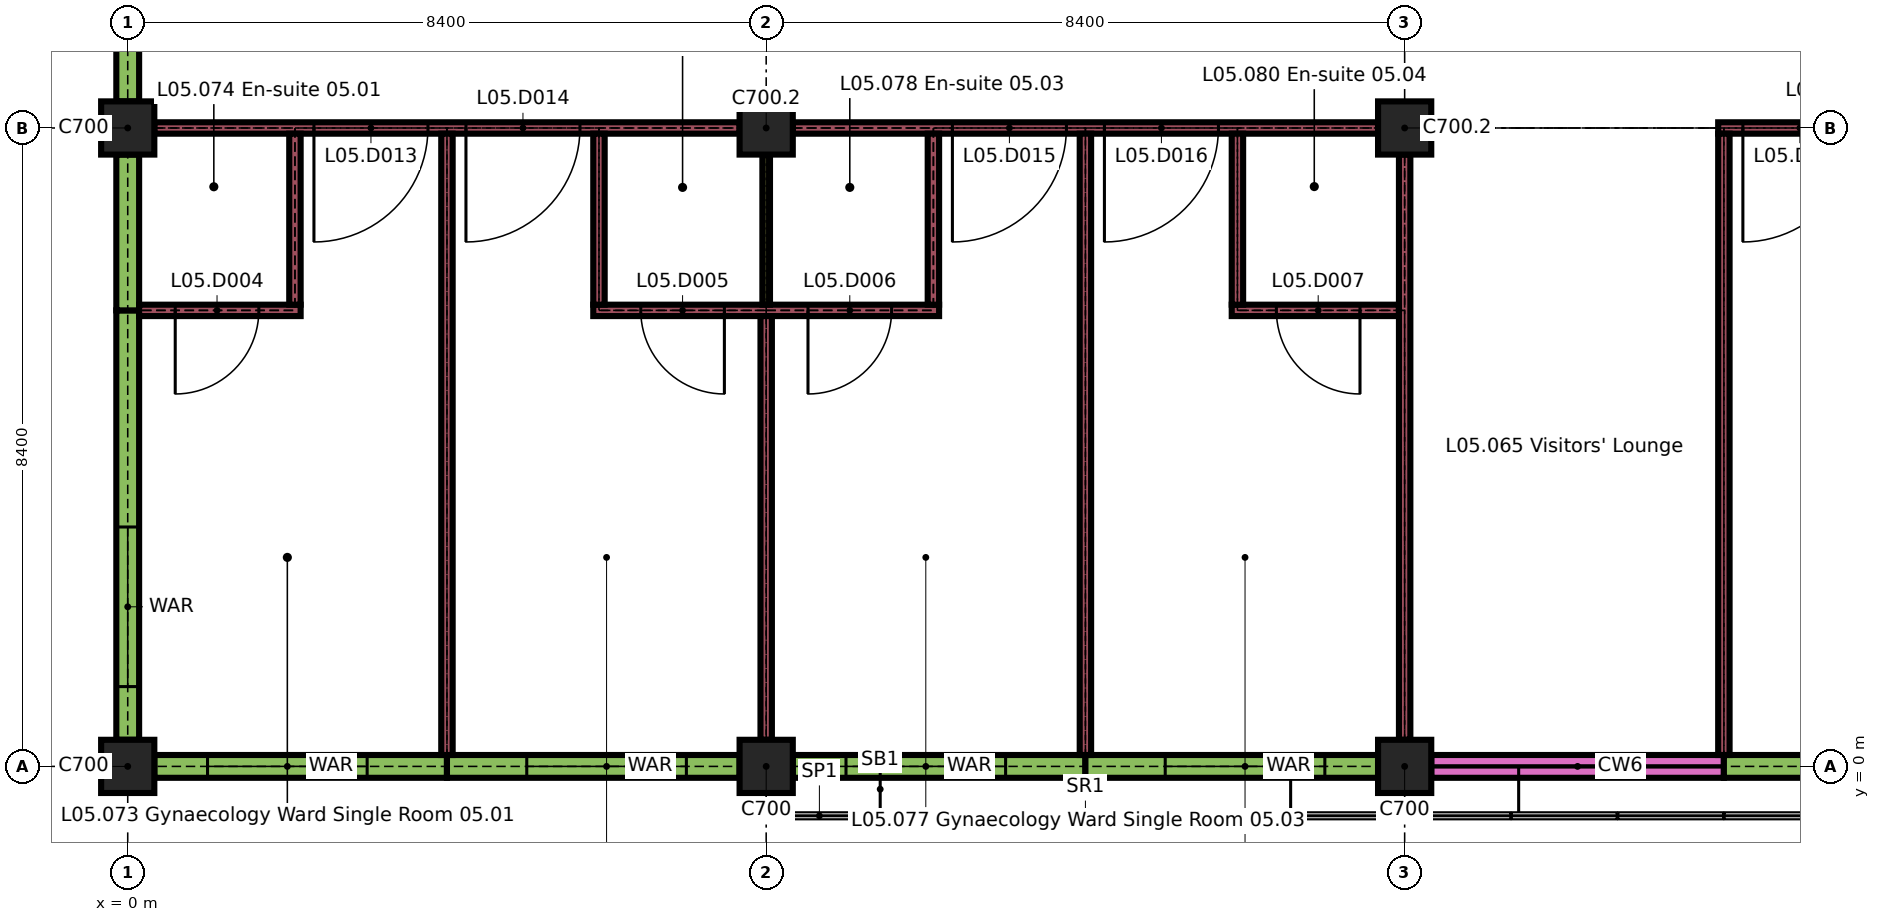
"""IFC4 building model, lengths in metres.
Left out: names, types, materials, properties, quantities, classifications, styles, units other than length and angle.
Written with IfcOpenShell. Run it as: python <this file> out.ifc"""

import sys

from ifc_helpers import new_model, si_unit, direction, frame, frame_2d, origin, origin_2d, place, context, subcontext, project, spatial, rectangle, extrude, element, fill, save


model = new_model("IFC4")
c1 = context("Model", 3, precision=1e-05, world=origin(), true_north=direction((0.0, 1.0)))
c2 = subcontext(c1, "Body", "Model", "MODEL_VIEW")
j1 = project(units=[si_unit("LENGTHUNIT", "METRE"), si_unit("PLANEANGLEUNIT", "RADIAN")], contexts=[c1])
p1 = place(None, origin())
s1 = spatial("IfcSite", under=j1, at=p1, CompositionType="ELEMENT")
p2 = place(p1, origin())
s2 = spatial("IfcBuilding", under=s1, at=p2, CompositionType="ELEMENT")
p3 = place(p2, frame((0.0, 0.0, 22.5)))
s3 = spatial("IfcBuildingStorey", under=s2, at=p3, CompositionType="ELEMENT", Elevation=22.5)
for number, where, z_axis, x_axis in (
    (1, (0.0, 0.0, 0.0), (0.0, 0.0, 1.0), (1.0, 0.0, 0.0)),
    (2, (8.4, 0.0, 0.0), (0.0, 0.0, 1.0), (1.0, 0.0, 0.0)),
    (3, (16.8, 0.0, 0.0), (0.0, 0.0, 1.0), (1.0, 0.0, 0.0)),
    (4, (0.0, 8.4, 0.0), (0.0, 0.0, 1.0), (1.0, 0.0, 0.0)),
    (5, (8.4, 8.4, 0.0), (0.0, 0.0, 1.0), (1.0, 0.0, 0.0)),
    (6, (16.8, 8.4, 0.0), (0.0, 0.0, 1.0), (1.0, 0.0, 0.0)),
):
    element("IfcColumn", number, at=place(p3, frame(where, z_axis=z_axis, x_axis=x_axis)), inside=s3, PredefinedType="COLUMN", context=c2, shape_type="SweptSolid", body=[
        extrude(rectangle(XDim=0.7, YDim=0.7, at=origin_2d()), origin(), (0.0, 0.0, 1.0), 3.26),
    ])
p4 = place(p3, frame((0.35, 0.0, 0.0), z_axis=(0.0, 0.0, 1.0), x_axis=(1.0, 0.0, 0.0)))
e7 = element("IfcWall", 7, at=p4, inside=s3, PredefinedType="SOLIDWALL", context=c2, shape_type="SweptSolid", body=[
    extrude(rectangle(XDim=3.85, YDim=0.3, at=frame_2d((1.925, 0.0))), origin(), (0.0, 0.0, 1.0), 2.96),
])
p5 = place(p4, frame((0.7, 0.0, 0.9)))
e8 = element("IfcOpeningElement", 8, at=p5, cuts=e7, PredefinedType="OPENING", context=c2, shape_type="SweptSolid", body=[
    extrude(rectangle(XDim=2.1, YDim=1.5, at=frame_2d((1.05, 0.75))), frame((0.0, 0.16, 0.0), z_axis=(0.0, -1.0, 0.0), x_axis=(1.0, 0.0, 0.0)), (0.0, 0.0, 1.0), 0.32),
])
p6 = place(p3, frame((4.2, 0.0, 0.0), z_axis=(0.0, 0.0, 1.0), x_axis=(1.0, 0.0, 0.0)))
e9 = element("IfcWall", 9, at=p6, inside=s3, PredefinedType="SOLIDWALL", context=c2, shape_type="SweptSolid", body=[
    extrude(rectangle(XDim=3.85, YDim=0.3, at=frame_2d((1.925, 0.0))), origin(), (0.0, 0.0, 1.0), 2.96),
])
p7 = place(p6, frame((1.05, 0.0, 0.9)))
e10 = element("IfcOpeningElement", 10, at=p7, cuts=e9, PredefinedType="OPENING", context=c2, shape_type="SweptSolid", body=[
    extrude(rectangle(XDim=2.1, YDim=1.5, at=frame_2d((1.05, 0.75))), frame((0.0, 0.16, 0.0), z_axis=(0.0, -1.0, 0.0), x_axis=(1.0, 0.0, 0.0)), (0.0, 0.0, 1.0), 0.32),
])
p8 = place(p3, frame((8.75, 0.0, 0.0), z_axis=(0.0, 0.0, 1.0), x_axis=(1.0, 0.0, 0.0)))
e11 = element("IfcWall", 11, at=p8, inside=s3, PredefinedType="SOLIDWALL", context=c2, shape_type="SweptSolid", body=[
    extrude(rectangle(XDim=3.85, YDim=0.3, at=frame_2d((1.925, 0.0))), origin(), (0.0, 0.0, 1.0), 2.96),
])
p9 = place(p8, frame((0.7, 0.0, 0.9)))
e12 = element("IfcOpeningElement", 12, at=p9, cuts=e11, PredefinedType="OPENING", context=c2, shape_type="SweptSolid", body=[
    extrude(rectangle(XDim=2.1, YDim=1.5, at=frame_2d((1.05, 0.75))), frame((0.0, 0.16, 0.0), z_axis=(0.0, -1.0, 0.0), x_axis=(1.0, 0.0, 0.0)), (0.0, 0.0, 1.0), 0.32),
])
p10 = place(p3, frame((12.6, 0.0, 0.0), z_axis=(0.0, 0.0, 1.0), x_axis=(1.0, 0.0, 0.0)))
e13 = element("IfcWall", 13, at=p10, inside=s3, PredefinedType="SOLIDWALL", context=c2, shape_type="SweptSolid", body=[
    extrude(rectangle(XDim=3.85, YDim=0.3, at=frame_2d((1.925, 0.0))), origin(), (0.0, 0.0, 1.0), 2.96),
])
p11 = place(p10, frame((1.05, 0.0, 0.9)))
e14 = element("IfcOpeningElement", 14, at=p11, cuts=e13, PredefinedType="OPENING", context=c2, shape_type="SweptSolid", body=[
    extrude(rectangle(XDim=2.1, YDim=1.5, at=frame_2d((1.05, 0.75))), frame((0.0, 0.16, 0.0), z_axis=(0.0, -1.0, 0.0), x_axis=(1.0, 0.0, 0.0)), (0.0, 0.0, 1.0), 0.32),
])
p12 = place(p3, frame((17.15, 0.0, 0.0), z_axis=(0.0, 0.0, 1.0), x_axis=(1.0, 0.0, 0.0)))
e15 = element("IfcWall", 15, at=p12, inside=s3, PredefinedType="SOLIDWALL", context=c2, shape_type="SweptSolid", body=[
    extrude(rectangle(XDim=3.85, YDim=0.3, at=frame_2d((1.925, 0.0))), origin(), (0.0, 0.0, 1.0), 0.6),
])
p13 = place(p3, frame((21.0, 0.0, 0.0), z_axis=(0.0, 0.0, 1.0), x_axis=(1.0, 0.0, 0.0)))
e16 = element("IfcWall", 16, at=p13, inside=s3, PredefinedType="SOLIDWALL", context=c2, shape_type="SweptSolid", body=[
    extrude(rectangle(XDim=3.85, YDim=0.3, at=frame_2d((1.925, 0.0))), origin(), (0.0, 0.0, 1.0), 2.96),
])
p14 = place(p13, frame((1.05, 0.0, 0.9)))
e17 = element("IfcOpeningElement", 17, at=p14, cuts=e16, PredefinedType="OPENING", context=c2, shape_type="SweptSolid", body=[
    extrude(rectangle(XDim=2.1, YDim=1.5, at=frame_2d((1.05, 0.75))), frame((0.0, 0.16, 0.0), z_axis=(0.0, -1.0, 0.0), x_axis=(1.0, 0.0, 0.0)), (0.0, 0.0, 1.0), 0.32),
])
p15 = place(p3, frame((0.0, 0.35, 0.0), z_axis=(0.0, 0.0, 1.0), x_axis=(0.0, 1.0, 0.0)))
e18 = element("IfcWall", 18, at=p15, inside=s3, PredefinedType="SOLIDWALL", context=c2, shape_type="SweptSolid", body=[
    extrude(rectangle(XDim=5.65, YDim=0.3, at=frame_2d((2.825, 0.0))), origin(), (0.0, 0.0, 1.0), 2.96),
])
p16 = place(p15, frame((0.7, 0.0, 0.9)))
e19 = element("IfcOpeningElement", 19, at=p16, cuts=e18, PredefinedType="OPENING", context=c2, shape_type="SweptSolid", body=[
    extrude(rectangle(XDim=2.1, YDim=1.5, at=frame_2d((1.05, 0.75))), frame((0.0, 0.16, 0.0), z_axis=(0.0, -1.0, 0.0), x_axis=(1.0, 0.0, 0.0)), (0.0, 0.0, 1.0), 0.32),
])
p17 = place(p3, frame((0.0, 6.0, 0.0), z_axis=(0.0, 0.0, 1.0), x_axis=(0.0, 1.0, 0.0)))
e20 = element("IfcWall", 20, at=p17, inside=s3, PredefinedType="SOLIDWALL", context=c2, shape_type="SweptSolid", body=[
    extrude(rectangle(XDim=2.05, YDim=0.3, at=frame_2d((1.025, 0.0))), origin(), (0.0, 0.0, 1.0), 2.96),
])
p18 = place(p3, frame((0.0, 8.75, 0.0), z_axis=(0.0, 0.0, 1.0), x_axis=(0.0, 1.0, 0.0)))
e21 = element("IfcWall", 21, at=p18, inside=s3, PredefinedType="SOLIDWALL", context=c2, shape_type="SweptSolid", body=[
    extrude(rectangle(XDim=2.65, YDim=0.3, at=frame_2d((1.325, 0.0))), origin(), (0.0, 0.0, 1.0), 2.96),
])
p19 = place(p18, frame((1.3, 0.0, 0.9)))
e22 = element("IfcOpeningElement", 22, at=p19, cuts=e21, PredefinedType="OPENING", context=c2, shape_type="SweptSolid", body=[
    extrude(rectangle(XDim=0.9, YDim=1.5, at=frame_2d((0.45, 0.75))), frame((0.0, 0.16, 0.0), z_axis=(0.0, -1.0, 0.0), x_axis=(1.0, 0.0, 0.0)), (0.0, 0.0, 1.0), 0.32),
])
p20 = place(p3, frame((0.15, 6.0, 0.0), z_axis=(0.0, 0.0, 1.0), x_axis=(1.0, 0.0, 0.0)))
e23 = element("IfcWall", 23, at=p20, inside=s3, PredefinedType="PARTITIONING", context=c2, shape_type="SweptSolid", body=[
    extrude(rectangle(XDim=2.125, YDim=0.15, at=frame_2d((1.062, 0.0))), origin(), (0.0, 0.0, 1.0), 3.26),
])
p21 = place(p20, frame((0.475, 0.0, 0.0)))
e24 = element("IfcOpeningElement", 24, at=p21, cuts=e23, PredefinedType="OPENING", context=c2, shape_type="SweptSolid", body=[
    extrude(rectangle(XDim=1.1, YDim=2.1, at=frame_2d((0.55, 1.05))), frame((0.0, 0.085, 0.0), z_axis=(0.0, -1.0, 0.0), x_axis=(1.0, 0.0, 0.0)), (0.0, 0.0, 1.0), 0.17),
])
p22 = place(p3, frame((6.125, 6.0, 0.0), z_axis=(0.0, 0.0, 1.0), x_axis=(1.0, 0.0, 0.0)))
e25 = element("IfcWall", 25, at=p22, inside=s3, PredefinedType="PARTITIONING", context=c2, shape_type="SweptSolid", body=[
    extrude(rectangle(XDim=4.55, YDim=0.15, at=frame_2d((2.275, 0.0))), origin(), (0.0, 0.0, 1.0), 3.26),
])
p23 = place(p22, frame((0.625, 0.0, 0.0)))
e26 = element("IfcOpeningElement", 26, at=p23, cuts=e25, PredefinedType="OPENING", context=c2, shape_type="SweptSolid", body=[
    extrude(rectangle(XDim=1.1, YDim=2.1, at=frame_2d((0.55, 1.05))), frame((0.0, 0.085, 0.0), z_axis=(0.0, -1.0, 0.0), x_axis=(1.0, 0.0, 0.0)), (0.0, 0.0, 1.0), 0.17),
])
p24 = place(p22, frame((2.825, 0.0, 0.0)))
e27 = element("IfcOpeningElement", 27, at=p24, cuts=e25, PredefinedType="OPENING", context=c2, shape_type="SweptSolid", body=[
    extrude(rectangle(XDim=1.1, YDim=2.1, at=frame_2d((0.55, 1.05))), frame((0.0, 0.085, 0.0), z_axis=(0.0, -1.0, 0.0), x_axis=(1.0, 0.0, 0.0)), (0.0, 0.0, 1.0), 0.17),
])
p25 = place(p3, frame((14.525, 6.0, 0.0), z_axis=(0.0, 0.0, 1.0), x_axis=(1.0, 0.0, 0.0)))
e28 = element("IfcWall", 28, at=p25, inside=s3, PredefinedType="PARTITIONING", context=c2, shape_type="SweptSolid", body=[
    extrude(rectangle(XDim=2.2, YDim=0.15, at=frame_2d((1.1, 0.0))), origin(), (0.0, 0.0, 1.0), 3.26),
])
p26 = place(p25, frame((0.587, 0.0, 0.0)))
e29 = element("IfcOpeningElement", 29, at=p26, cuts=e28, PredefinedType="OPENING", context=c2, shape_type="SweptSolid", body=[
    extrude(rectangle(XDim=1.1, YDim=2.1, at=frame_2d((0.55, 1.05))), frame((0.0, 0.085, 0.0), z_axis=(0.0, -1.0, 0.0), x_axis=(1.0, 0.0, 0.0)), (0.0, 0.0, 1.0), 0.17),
])
p27 = place(p3, frame((0.35, 8.4, 0.0), z_axis=(0.0, 0.0, 1.0), x_axis=(1.0, 0.0, 0.0)))
e30 = element("IfcWall", 30, at=p27, inside=s3, PredefinedType="PARTITIONING", context=c2, shape_type="SweptSolid", body=[
    extrude(rectangle(XDim=7.7, YDim=0.15, at=frame_2d((3.85, 0.0))), origin(), (0.0, 0.0, 1.0), 3.26),
])
p28 = place(p27, frame((2.1, 0.0, 0.0)))
e31 = element("IfcOpeningElement", 31, at=p28, cuts=e30, PredefinedType="OPENING", context=c2, shape_type="SweptSolid", body=[
    extrude(rectangle(XDim=1.5, YDim=2.4, at=frame_2d((0.75, 1.2))), frame((0.0, 0.085, 0.0), z_axis=(0.0, -1.0, 0.0), x_axis=(1.0, 0.0, 0.0)), (0.0, 0.0, 1.0), 0.17),
])
p29 = place(p27, frame((4.1, 0.0, 0.0)))
e32 = element("IfcOpeningElement", 32, at=p29, cuts=e30, PredefinedType="OPENING", context=c2, shape_type="SweptSolid", body=[
    extrude(rectangle(XDim=1.5, YDim=2.4, at=frame_2d((0.75, 1.2))), frame((0.0, 0.085, 0.0), z_axis=(0.0, -1.0, 0.0), x_axis=(1.0, 0.0, 0.0)), (0.0, 0.0, 1.0), 0.17),
])
p30 = place(p3, frame((8.75, 8.4, 0.0), z_axis=(0.0, 0.0, 1.0), x_axis=(1.0, 0.0, 0.0)))
e33 = element("IfcWall", 33, at=p30, inside=s3, PredefinedType="PARTITIONING", context=c2, shape_type="SweptSolid", body=[
    extrude(rectangle(XDim=7.7, YDim=0.15, at=frame_2d((3.85, 0.0))), origin(), (0.0, 0.0, 1.0), 3.26),
])
p31 = place(p30, frame((2.1, 0.0, 0.0)))
e34 = element("IfcOpeningElement", 34, at=p31, cuts=e33, PredefinedType="OPENING", context=c2, shape_type="SweptSolid", body=[
    extrude(rectangle(XDim=1.5, YDim=2.4, at=frame_2d((0.75, 1.2))), frame((0.0, 0.085, 0.0), z_axis=(0.0, -1.0, 0.0), x_axis=(1.0, 0.0, 0.0)), (0.0, 0.0, 1.0), 0.17),
])
p32 = place(p30, frame((4.1, 0.0, 0.0)))
e35 = element("IfcOpeningElement", 35, at=p32, cuts=e33, PredefinedType="OPENING", context=c2, shape_type="SweptSolid", body=[
    extrude(rectangle(XDim=1.5, YDim=2.4, at=frame_2d((0.75, 1.2))), frame((0.0, 0.085, 0.0), z_axis=(0.0, -1.0, 0.0), x_axis=(1.0, 0.0, 0.0)), (0.0, 0.0, 1.0), 0.17),
])
p33 = place(p3, frame((20.925, 8.4, 0.0), z_axis=(0.0, 0.0, 1.0), x_axis=(1.0, 0.0, 0.0)))
e36 = element("IfcWall", 36, at=p33, inside=s3, PredefinedType="PARTITIONING", context=c2, shape_type="SweptSolid", body=[
    extrude(rectangle(XDim=3.925, YDim=0.15, at=frame_2d((1.962, 0.0))), origin(), (0.0, 0.0, 1.0), 3.26),
])
p34 = place(p33, frame((0.325, 0.0, 0.0)))
e37 = element("IfcOpeningElement", 37, at=p34, cuts=e36, PredefinedType="OPENING", context=c2, shape_type="SweptSolid", body=[
    extrude(rectangle(XDim=1.5, YDim=2.4, at=frame_2d((0.75, 1.2))), frame((0.0, 0.085, 0.0), z_axis=(0.0, -1.0, 0.0), x_axis=(1.0, 0.0, 0.0)), (0.0, 0.0, 1.0), 0.17),
])
p35 = place(p3, frame((2.2, 6.075, 0.0), z_axis=(0.0, 0.0, 1.0), x_axis=(0.0, 1.0, 0.0)))
e38 = element("IfcWall", 38, at=p35, inside=s3, PredefinedType="PARTITIONING", context=c2, shape_type="SweptSolid", body=[
    extrude(rectangle(XDim=2.25, YDim=0.15, at=frame_2d((1.125, 0.0))), origin(), (0.0, 0.0, 1.0), 3.26),
])
p36 = place(p3, frame((4.2, 0.15, 0.0), z_axis=(0.0, 0.0, 1.0), x_axis=(0.0, 1.0, 0.0)))
e39 = element("IfcWall", 39, at=p36, inside=s3, PredefinedType="PARTITIONING", context=c2, shape_type="SweptSolid", body=[
    extrude(rectangle(XDim=8.175, YDim=0.15, at=frame_2d((4.087, 0.0))), origin(), (0.0, 0.0, 1.0), 3.26),
])
p37 = place(p3, frame((6.2, 6.075, 0.0), z_axis=(0.0, 0.0, 1.0), x_axis=(0.0, 1.0, 0.0)))
e40 = element("IfcWall", 40, at=p37, inside=s3, PredefinedType="PARTITIONING", context=c2, shape_type="SweptSolid", body=[
    extrude(rectangle(XDim=2.25, YDim=0.15, at=frame_2d((1.125, 0.0))), origin(), (0.0, 0.0, 1.0), 3.26),
])
p38 = place(p3, frame((8.4, 0.35, 0.0), z_axis=(0.0, 0.0, 1.0), x_axis=(0.0, 1.0, 0.0)))
e41 = element("IfcWall", 41, at=p38, inside=s3, PredefinedType="PARTITIONING", context=c2, shape_type="SweptSolid", body=[
    extrude(rectangle(XDim=5.575, YDim=0.15, at=frame_2d((2.788, 0.0))), origin(), (0.0, 0.0, 1.0), 3.26),
])
p39 = place(p3, frame((8.4, 6.075, 0.0), z_axis=(0.0, 0.0, 1.0), x_axis=(0.0, 1.0, 0.0)))
e42 = element("IfcWall", 42, at=p39, inside=s3, PredefinedType="PARTITIONING", context=c2, shape_type="SweptSolid", body=[
    extrude(rectangle(XDim=1.975, YDim=0.1, at=frame_2d((0.988, 0.0))), origin(), (0.0, 0.0, 1.0), 3.26),
])
p40 = place(p3, frame((10.6, 6.075, 0.0), z_axis=(0.0, 0.0, 1.0), x_axis=(0.0, 1.0, 0.0)))
e43 = element("IfcWall", 43, at=p40, inside=s3, PredefinedType="PARTITIONING", context=c2, shape_type="SweptSolid", body=[
    extrude(rectangle(XDim=2.25, YDim=0.15, at=frame_2d((1.125, 0.0))), origin(), (0.0, 0.0, 1.0), 3.26),
])
p41 = place(p3, frame((12.6, 0.15, 0.0), z_axis=(0.0, 0.0, 1.0), x_axis=(0.0, 1.0, 0.0)))
e44 = element("IfcWall", 44, at=p41, inside=s3, PredefinedType="PARTITIONING", context=c2, shape_type="SweptSolid", body=[
    extrude(rectangle(XDim=8.175, YDim=0.15, at=frame_2d((4.087, 0.0))), origin(), (0.0, 0.0, 1.0), 3.26),
])
p42 = place(p3, frame((14.6, 6.075, 0.0), z_axis=(0.0, 0.0, 1.0), x_axis=(0.0, 1.0, 0.0)))
e45 = element("IfcWall", 45, at=p42, inside=s3, PredefinedType="PARTITIONING", context=c2, shape_type="SweptSolid", body=[
    extrude(rectangle(XDim=2.25, YDim=0.15, at=frame_2d((1.125, 0.0))), origin(), (0.0, 0.0, 1.0), 3.26),
])
p43 = place(p3, frame((16.8, 0.35, 0.0), z_axis=(0.0, 0.0, 1.0), x_axis=(0.0, 1.0, 0.0)))
e46 = element("IfcWall", 46, at=p43, inside=s3, PredefinedType="PARTITIONING", context=c2, shape_type="SweptSolid", body=[
    extrude(rectangle(XDim=7.7, YDim=0.15, at=frame_2d((3.85, 0.0))), origin(), (0.0, 0.0, 1.0), 3.26),
])
p44 = place(p3, frame((21.0, 0.15, 0.0), z_axis=(0.0, 0.0, 1.0), x_axis=(0.0, 1.0, 0.0)))
e47 = element("IfcWall", 47, at=p44, inside=s3, PredefinedType="PARTITIONING", context=c2, shape_type="SweptSolid", body=[
    extrude(rectangle(XDim=8.175, YDim=0.15, at=frame_2d((4.087, 0.0))), origin(), (0.0, 0.0, 1.0), 3.26),
])
p45 = place(p5, origin())
e48 = element("IfcWindow", 48, at=p45, inside=s3, PartitioningType="DOUBLE_PANEL_VERTICAL", PredefinedType="WINDOW", context=c2, shape_type="SweptSolid", body=[
    extrude(rectangle(XDim=2.1, YDim=1.5, at=frame_2d((1.05, 0.75))), frame((0.0, 0.05, 0.0), z_axis=(0.0, -1.0, 0.0), x_axis=(1.0, 0.0, 0.0)), (0.0, 0.0, 1.0), 0.1),
])
fill(e8, e48)
p46 = place(p7, origin())
e49 = element("IfcWindow", 49, at=p46, inside=s3, PartitioningType="DOUBLE_PANEL_VERTICAL", PredefinedType="WINDOW", context=c2, shape_type="SweptSolid", body=[
    extrude(rectangle(XDim=2.1, YDim=1.5, at=frame_2d((1.05, 0.75))), frame((0.0, 0.05, 0.0), z_axis=(0.0, -1.0, 0.0), x_axis=(1.0, 0.0, 0.0)), (0.0, 0.0, 1.0), 0.1),
])
fill(e10, e49)
p47 = place(p9, origin())
e50 = element("IfcWindow", 50, at=p47, inside=s3, PartitioningType="DOUBLE_PANEL_VERTICAL", PredefinedType="WINDOW", context=c2, shape_type="SweptSolid", body=[
    extrude(rectangle(XDim=2.1, YDim=1.5, at=frame_2d((1.05, 0.75))), frame((0.0, 0.05, 0.0), z_axis=(0.0, -1.0, 0.0), x_axis=(1.0, 0.0, 0.0)), (0.0, 0.0, 1.0), 0.1),
])
fill(e12, e50)
p48 = place(p11, origin())
e51 = element("IfcWindow", 51, at=p48, inside=s3, PartitioningType="DOUBLE_PANEL_VERTICAL", PredefinedType="WINDOW", context=c2, shape_type="SweptSolid", body=[
    extrude(rectangle(XDim=2.1, YDim=1.5, at=frame_2d((1.05, 0.75))), frame((0.0, 0.05, 0.0), z_axis=(0.0, -1.0, 0.0), x_axis=(1.0, 0.0, 0.0)), (0.0, 0.0, 1.0), 0.1),
])
fill(e14, e51)
p49 = place(p16, origin())
e52 = element("IfcWindow", 52, at=p49, inside=s3, PartitioningType="DOUBLE_PANEL_VERTICAL", PredefinedType="WINDOW", context=c2, shape_type="SweptSolid", body=[
    extrude(rectangle(XDim=2.1, YDim=1.5, at=frame_2d((1.05, 0.75))), frame((0.0, 0.05, 0.0), z_axis=(0.0, -1.0, 0.0), x_axis=(1.0, 0.0, 0.0)), (0.0, 0.0, 1.0), 0.1),
])
fill(e19, e52)
p50 = place(p21, origin())
e53 = element("IfcDoor", 53, at=p50, inside=s3, OperationType="SINGLE_SWING_LEFT", PredefinedType="DOOR", context=c2, shape_type="SweptSolid", body=[
    extrude(rectangle(XDim=1.1, YDim=2.1, at=frame_2d((0.55, 1.05))), frame((0.0, 0.025, 0.0), z_axis=(0.0, -1.0, 0.0), x_axis=(1.0, 0.0, 0.0)), (0.0, 0.0, 1.0), 0.05),
])
fill(e24, e53)
p51 = place(p23, origin())
e54 = element("IfcDoor", 54, at=p51, inside=s3, OperationType="SINGLE_SWING_RIGHT", PredefinedType="DOOR", context=c2, shape_type="SweptSolid", body=[
    extrude(rectangle(XDim=1.1, YDim=2.1, at=frame_2d((0.55, 1.05))), frame((0.0, 0.025, 0.0), z_axis=(0.0, -1.0, 0.0), x_axis=(1.0, 0.0, 0.0)), (0.0, 0.0, 1.0), 0.05),
])
fill(e26, e54)
p52 = place(p24, origin())
e55 = element("IfcDoor", 55, at=p52, inside=s3, OperationType="SINGLE_SWING_LEFT", PredefinedType="DOOR", context=c2, shape_type="SweptSolid", body=[
    extrude(rectangle(XDim=1.1, YDim=2.1, at=frame_2d((0.55, 1.05))), frame((0.0, 0.025, 0.0), z_axis=(0.0, -1.0, 0.0), x_axis=(1.0, 0.0, 0.0)), (0.0, 0.0, 1.0), 0.05),
])
fill(e27, e55)
p53 = place(p26, origin())
e56 = element("IfcDoor", 56, at=p53, inside=s3, OperationType="SINGLE_SWING_RIGHT", PredefinedType="DOOR", context=c2, shape_type="SweptSolid", body=[
    extrude(rectangle(XDim=1.1, YDim=2.1, at=frame_2d((0.55, 1.05))), frame((0.0, 0.025, 0.0), z_axis=(0.0, -1.0, 0.0), x_axis=(1.0, 0.0, 0.0)), (0.0, 0.0, 1.0), 0.05),
])
fill(e29, e56)
p54 = place(p28, origin())
e57 = element("IfcDoor", 57, at=p54, inside=s3, OperationType="SINGLE_SWING_LEFT", PredefinedType="DOOR", context=c2, shape_type="SweptSolid", body=[
    extrude(rectangle(XDim=1.5, YDim=2.4, at=frame_2d((0.75, 1.2))), frame((0.0, 0.03, 0.0), z_axis=(0.0, -1.0, 0.0), x_axis=(1.0, 0.0, 0.0)), (0.0, 0.0, 1.0), 0.06),
])
fill(e31, e57)
p55 = place(p29, origin())
e58 = element("IfcDoor", 58, at=p55, inside=s3, OperationType="SINGLE_SWING_LEFT", PredefinedType="DOOR", context=c2, shape_type="SweptSolid", body=[
    extrude(rectangle(XDim=1.5, YDim=2.4, at=frame_2d((0.75, 1.2))), frame((0.0, 0.03, 0.0), z_axis=(0.0, -1.0, 0.0), x_axis=(1.0, 0.0, 0.0)), (0.0, 0.0, 1.0), 0.06),
])
fill(e32, e58)
p56 = place(p31, origin())
e59 = element("IfcDoor", 59, at=p56, inside=s3, OperationType="SINGLE_SWING_LEFT", PredefinedType="DOOR", context=c2, shape_type="SweptSolid", body=[
    extrude(rectangle(XDim=1.5, YDim=2.4, at=frame_2d((0.75, 1.2))), frame((0.0, 0.03, 0.0), z_axis=(0.0, -1.0, 0.0), x_axis=(1.0, 0.0, 0.0)), (0.0, 0.0, 1.0), 0.06),
])
fill(e34, e59)
p57 = place(p32, origin())
e60 = element("IfcDoor", 60, at=p57, inside=s3, OperationType="SINGLE_SWING_LEFT", PredefinedType="DOOR", context=c2, shape_type="SweptSolid", body=[
    extrude(rectangle(XDim=1.5, YDim=2.4, at=frame_2d((0.75, 1.2))), frame((0.0, 0.03, 0.0), z_axis=(0.0, -1.0, 0.0), x_axis=(1.0, 0.0, 0.0)), (0.0, 0.0, 1.0), 0.06),
])
fill(e35, e60)
p58 = place(p34, origin())
e61 = element("IfcDoor", 61, at=p58, inside=s3, OperationType="SINGLE_SWING_LEFT", PredefinedType="DOOR", context=c2, shape_type="SweptSolid", body=[
    extrude(rectangle(XDim=1.5, YDim=2.4, at=frame_2d((0.75, 1.2))), frame((0.0, 0.03, 0.0), z_axis=(0.0, -1.0, 0.0), x_axis=(1.0, 0.0, 0.0)), (0.0, 0.0, 1.0), 0.06),
])
fill(e37, e61)
save(model, sys.argv[1])
